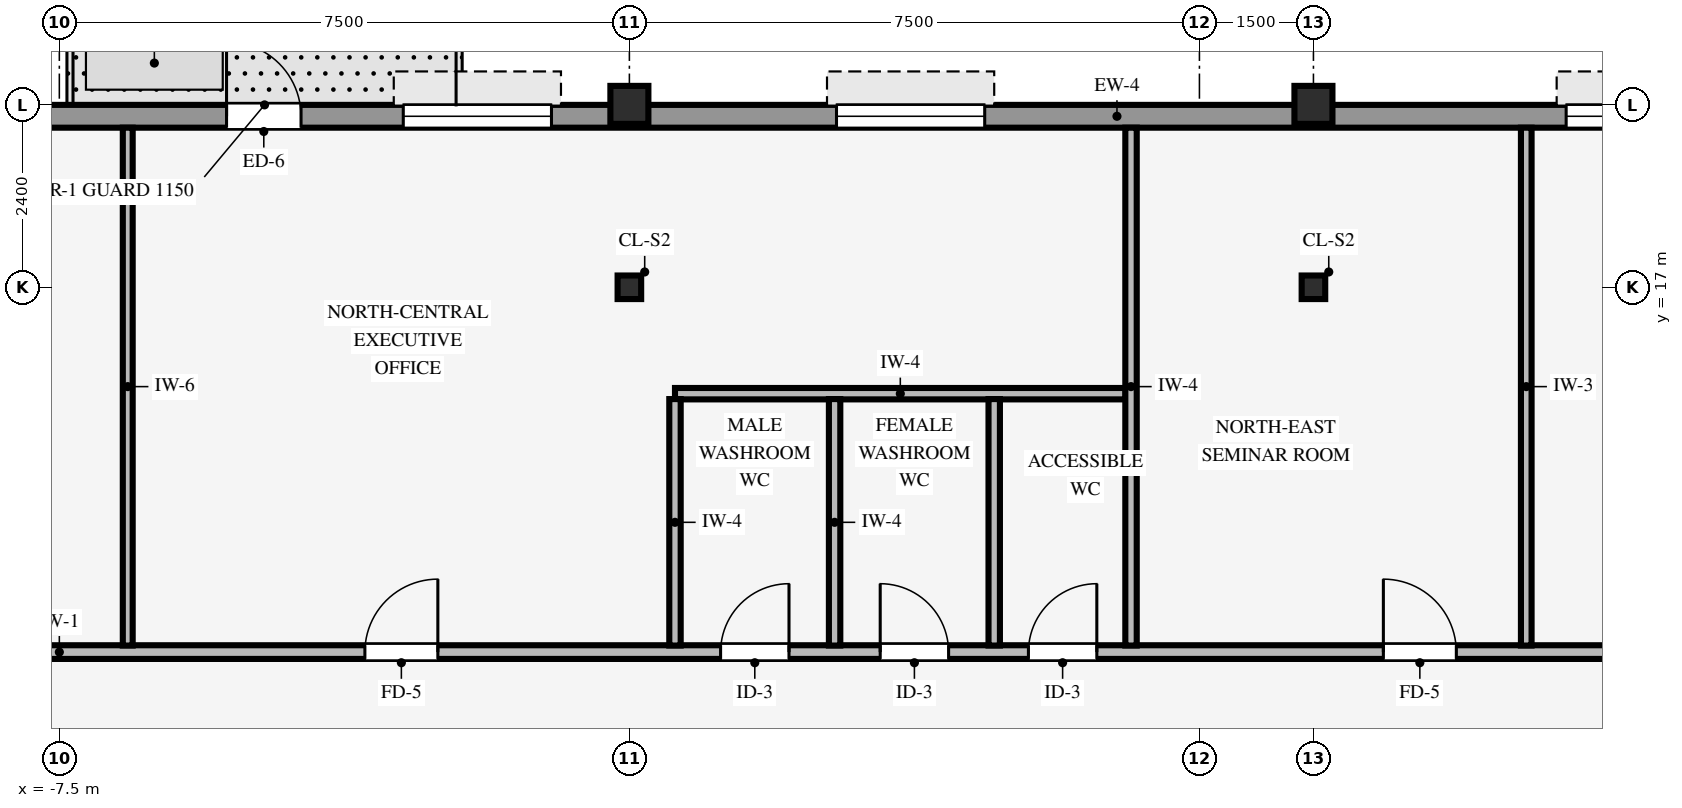
"""IFC4 building model, lengths in metres.
Left out: names, types, materials, properties, quantities, classifications, styles, units other than length and angle.
Written with IfcOpenShell. Run it as: python <this file> out.ifc"""

import sys

from ifc_helpers import new_model, si_unit, direction, frame, frame_2d, origin, origin_2d, place, context, subcontext, project, spatial, rectangle, hollow_rectangle, i_section, extrude, source, transform, mapped, element, fill, save


model = new_model("IFC4")
c1 = context("Model", 3, precision=1e-05, world=origin(), true_north=direction((0.0, 1.0)))
c2 = subcontext(c1, "Body", "Model", "MODEL_VIEW")
j1 = project(units=[si_unit("LENGTHUNIT", "METRE"), si_unit("PLANEANGLEUNIT", "RADIAN")], contexts=[c1])
p1 = place(None, origin())
s1 = spatial("IfcSite", under=j1, at=p1, CompositionType="ELEMENT")
p2 = place(p1, origin())
s2 = spatial("IfcBuilding", under=s1, at=p2, CompositionType="ELEMENT")
p3 = place(p2, frame((0.0, 0.0, 276.2)))
s3 = spatial("IfcBuildingStorey", under=s2, at=p3, CompositionType="ELEMENT", Elevation=276.2)
for number, where, z_axis, x_axis in (
    (1, (0.0, 19.4, 0.0), (0.0, 0.0, 1.0), (1.0, 0.0, 0.0)),
    (2, (9.0, 19.4, 0.0), (0.0, 0.0, 1.0), (1.0, 0.0, 0.0)),
):
    element("IfcColumn", number, at=place(p3, frame(where, z_axis=z_axis, x_axis=x_axis)), inside=s3, PredefinedType="COLUMN", context=c2, shape_type="SweptSolid", body=[
        extrude(hollow_rectangle(XDim=0.5, YDim=0.5, WallThickness=0.032, InnerFilletRadius=0.032, OuterFilletRadius=0.064, at=origin_2d()), origin(), (0.0, 0.0, 1.0), 3.37),
    ])
for number, where, z_axis, x_axis in (
    (3, (0.0, 17.0, 0.0), (0.0, 0.0, 1.0), (1.0, 0.0, 0.0)),
    (4, (9.0, 17.0, 0.0), (0.0, 0.0, 1.0), (1.0, 0.0, 0.0)),
):
    element("IfcColumn", number, at=place(p3, frame(where, z_axis=z_axis, x_axis=x_axis)), inside=s3, PredefinedType="COLUMN", context=c2, shape_type="SweptSolid", body=[
        extrude(i_section(OverallWidth=0.31, OverallDepth=0.31, WebThickness=0.015, FlangeThickness=0.015, FilletRadius=0.015, at=origin_2d()), origin(), (0.0, 0.0, 1.0), 3.37),
    ])
p4 = place(p3, frame((-18.9, 19.25, 0.0), z_axis=(0.0, 0.0, 1.0), x_axis=(1.0, 0.0, 0.0)))
e5 = element("IfcWall", 5, at=p4, inside=s3, PredefinedType="STANDARD", context=c2, shape_type="SweptSolid", body=[
    extrude(rectangle(XDim=35.6, YDim=0.3, at=frame_2d((17.8, 0.0))), origin(), (0.0, 0.0, 1.0), 2.705),
])
p5 = place(p4, frame((13.6, 0.0, 0.0)))
e6 = element("IfcOpeningElement", 6, at=p5, cuts=e5, PredefinedType="OPENING", context=c2, shape_type="SweptSolid", body=[
    extrude(rectangle(XDim=0.98, YDim=2.15, at=frame_2d((0.49, 1.075))), frame((0.0, 0.16, 0.0), z_axis=(0.0, -1.0, 0.0), x_axis=(1.0, 0.0, 0.0)), (0.0, 0.0, 1.0), 0.32),
])
p6 = place(p4, frame((2.425, 0.0, 0.8)))
e7 = element("IfcOpeningElement", 7, at=p6, cuts=e5, PredefinedType="OPENING", context=c2, shape_type="SweptSolid", body=[
    extrude(rectangle(XDim=1.95, YDim=1.48, at=frame_2d((0.975, 0.74))), frame((0.0, 0.16, 0.0), z_axis=(0.0, -1.0, 0.0), x_axis=(1.0, 0.0, 0.0)), (0.0, 0.0, 1.0), 0.32),
])
p7 = place(p4, frame((7.225, 0.0, 0.8)))
e8 = element("IfcOpeningElement", 8, at=p7, cuts=e5, PredefinedType="OPENING", context=c2, shape_type="SweptSolid", body=[
    extrude(rectangle(XDim=1.95, YDim=1.48, at=frame_2d((0.975, 0.74))), frame((0.0, 0.16, 0.0), z_axis=(0.0, -1.0, 0.0), x_axis=(1.0, 0.0, 0.0)), (0.0, 0.0, 1.0), 0.32),
])
p8 = place(p4, frame((15.925, 0.0, 0.8)))
e9 = element("IfcOpeningElement", 9, at=p8, cuts=e5, PredefinedType="OPENING", context=c2, shape_type="SweptSolid", body=[
    extrude(rectangle(XDim=1.95, YDim=1.48, at=frame_2d((0.975, 0.74))), frame((0.0, 0.16, 0.0), z_axis=(0.0, -1.0, 0.0), x_axis=(1.0, 0.0, 0.0)), (0.0, 0.0, 1.0), 0.32),
])
p9 = place(p4, frame((21.625, 0.0, 0.8)))
e10 = element("IfcOpeningElement", 10, at=p9, cuts=e5, PredefinedType="OPENING", context=c2, shape_type="SweptSolid", body=[
    extrude(rectangle(XDim=1.95, YDim=1.48, at=frame_2d((0.975, 0.74))), frame((0.0, 0.16, 0.0), z_axis=(0.0, -1.0, 0.0), x_axis=(1.0, 0.0, 0.0)), (0.0, 0.0, 1.0), 0.32),
])
p10 = place(p4, frame((31.225, 0.0, 0.8)))
e11 = element("IfcOpeningElement", 11, at=p10, cuts=e5, PredefinedType="OPENING", context=c2, shape_type="SweptSolid", body=[
    extrude(rectangle(XDim=1.95, YDim=1.48, at=frame_2d((0.975, 0.74))), frame((0.0, 0.16, 0.0), z_axis=(0.0, -1.0, 0.0), x_axis=(1.0, 0.0, 0.0)), (0.0, 0.0, 1.0), 0.32),
])
p11 = place(p3, frame((-15.0, 12.2, 0.0), z_axis=(0.0, 0.0, 1.0), x_axis=(1.0, 0.0, 0.0)))
e12 = element("IfcWall", 12, at=p11, inside=s3, PredefinedType="PARTITIONING", context=c2, shape_type="SweptSolid", body=[
    extrude(rectangle(XDim=30.8, YDim=0.18, at=frame_2d((15.4, 0.0))), origin(), (0.0, 0.0, 1.0), 3.36),
])
p12 = place(p11, frame((11.52, 0.0, 0.0)))
e13 = element("IfcOpeningElement", 13, at=p12, cuts=e12, PredefinedType="OPENING", context=c2, shape_type="SweptSolid", body=[
    extrude(rectangle(XDim=0.96, YDim=2.1, at=frame_2d((0.48, 1.05))), frame((0.0, 0.1, 0.0), z_axis=(0.0, -1.0, 0.0), x_axis=(1.0, 0.0, 0.0)), (0.0, 0.0, 1.0), 0.2),
])
p13 = place(p11, frame((2.52, 0.0, 0.0)))
e14 = element("IfcOpeningElement", 14, at=p13, cuts=e12, PredefinedType="OPENING", context=c2, shape_type="SweptSolid", body=[
    extrude(rectangle(XDim=0.96, YDim=2.1, at=frame_2d((0.48, 1.05))), frame((0.0, 0.1, 0.0), z_axis=(0.0, -1.0, 0.0), x_axis=(1.0, 0.0, 0.0)), (0.0, 0.0, 1.0), 0.2),
])
p14 = place(p11, frame((28.32, 0.0, 0.0)))
e15 = element("IfcOpeningElement", 15, at=p14, cuts=e12, PredefinedType="OPENING", context=c2, shape_type="SweptSolid", body=[
    extrude(rectangle(XDim=0.96, YDim=2.1, at=frame_2d((0.48, 1.05))), frame((0.0, 0.1, 0.0), z_axis=(0.0, -1.0, 0.0), x_axis=(1.0, 0.0, 0.0)), (0.0, 0.0, 1.0), 0.2),
])
p15 = place(p11, frame((24.92, 0.0, 0.0)))
e16 = element("IfcOpeningElement", 16, at=p15, cuts=e12, PredefinedType="OPENING", context=c2, shape_type="SweptSolid", body=[
    extrude(rectangle(XDim=0.96, YDim=2.1, at=frame_2d((0.48, 1.05))), frame((0.0, 0.1, 0.0), z_axis=(0.0, -1.0, 0.0), x_axis=(1.0, 0.0, 0.0)), (0.0, 0.0, 1.0), 0.2),
])
p16 = place(p11, frame((16.2, 0.0, 0.0)))
e17 = element("IfcOpeningElement", 17, at=p16, cuts=e12, PredefinedType="OPENING", context=c2, shape_type="SweptSolid", body=[
    extrude(rectangle(XDim=0.9, YDim=2.1, at=frame_2d((0.45, 1.05))), frame((0.0, 0.1, 0.0), z_axis=(0.0, -1.0, 0.0), x_axis=(1.0, 0.0, 0.0)), (0.0, 0.0, 1.0), 0.2),
])
p17 = place(p11, frame((18.3, 0.0, 0.0)))
e18 = element("IfcOpeningElement", 18, at=p17, cuts=e12, PredefinedType="OPENING", context=c2, shape_type="SweptSolid", body=[
    extrude(rectangle(XDim=0.9, YDim=2.1, at=frame_2d((0.45, 1.05))), frame((0.0, 0.1, 0.0), z_axis=(0.0, -1.0, 0.0), x_axis=(1.0, 0.0, 0.0)), (0.0, 0.0, 1.0), 0.2),
])
p18 = place(p11, frame((20.25, 0.0, 0.0)))
e19 = element("IfcOpeningElement", 19, at=p18, cuts=e12, PredefinedType="OPENING", context=c2, shape_type="SweptSolid", body=[
    extrude(rectangle(XDim=0.9, YDim=2.1, at=frame_2d((0.45, 1.05))), frame((0.0, 0.1, 0.0), z_axis=(0.0, -1.0, 0.0), x_axis=(1.0, 0.0, 0.0)), (0.0, 0.0, 1.0), 0.2),
])
p19 = place(p3, frame((0.6, 15.6, 0.0), z_axis=(0.0, 0.0, 1.0), x_axis=(1.0, 0.0, 0.0)))
e20 = element("IfcWall", 20, at=p19, inside=s3, PredefinedType="PARTITIONING", context=c2, shape_type="SweptSolid", body=[
    extrude(rectangle(XDim=5.929, YDim=0.15, at=frame_2d((2.964, 0.0))), origin(), (0.0, 0.0, 1.0), 3.36),
])
p20 = place(p3, frame((-6.6, 12.286, 0.0), z_axis=(0.0, 0.0, 1.0), x_axis=(0.0, 1.0, 0.0)))
e21 = element("IfcWall", 21, at=p20, inside=s3, PredefinedType="PARTITIONING", context=c2, shape_type="SweptSolid", body=[
    extrude(rectangle(XDim=6.814, YDim=0.13, at=frame_2d((3.407, 0.0))), origin(), (0.0, 0.0, 1.0), 3.36),
])
for number, where, z_axis, x_axis in (
    (22, (0.6, 12.286, 0.0), (0.0, 0.0, 1.0), (0.0, 1.0, 0.0)),
    (23, (2.7, 12.286, 0.0), (0.0, 0.0, 1.0), (0.0, 1.0, 0.0)),
    (24, (4.8, 12.286, 0.0), (0.0, 0.0, 1.0), (0.0, 1.0, 0.0)),
):
    element("IfcWall", number, at=place(p3, frame(where, z_axis=z_axis, x_axis=x_axis)), inside=s3, PredefinedType="PARTITIONING", context=c2, shape_type="SweptSolid", body=[
        extrude(rectangle(XDim=3.243, YDim=0.15, at=frame_2d((1.622, 0.0))), origin(), (0.0, 0.0, 1.0), 3.36),
    ])
p21 = place(p3, frame((6.6, 12.286, 0.0), z_axis=(0.0, 0.0, 1.0), x_axis=(0.0, 1.0, 0.0)))
e25 = element("IfcWall", 25, at=p21, inside=s3, PredefinedType="PARTITIONING", context=c2, shape_type="SweptSolid", body=[
    extrude(rectangle(XDim=6.814, YDim=0.15, at=frame_2d((3.407, 0.0))), origin(), (0.0, 0.0, 1.0), 3.36),
])
p22 = place(p3, frame((11.8, 12.286, 0.0), z_axis=(0.0, 0.0, 1.0), x_axis=(0.0, 1.0, 0.0)))
e26 = element("IfcWall", 26, at=p22, inside=s3, PredefinedType="PARTITIONING", context=c2, shape_type="SweptSolid", body=[
    extrude(rectangle(XDim=6.814, YDim=0.14, at=frame_2d((3.407, 0.0))), origin(), (0.0, 0.0, 1.0), 3.36),
])
m1 = source(origin(), c2, "Body", "SweptSolid", [
    extrude(rectangle(XDim=0.98, YDim=2.15, at=frame_2d((0.49, 1.075))), frame((0.0, 0.025, 0.0), z_axis=(0.0, -1.0, 0.0), x_axis=(1.0, 0.0, 0.0)), (0.0, 0.0, 1.0), 0.05),
])
p23 = place(p5, origin())
e27 = element("IfcDoor", 27, at=p23, inside=s3, OperationType="SINGLE_SWING_LEFT", PredefinedType="DOOR", context=c2, shape_type="MappedRepresentation", body=[
    mapped(m1, transform((0.0, 0.0, 0.0), scale=1.0)),
])
fill(e6, e27)
m2 = source(origin(), c2, "Body", "SweptSolid", [
    extrude(rectangle(XDim=1.95, YDim=1.48, at=frame_2d((0.975, 0.74))), frame((0.0, 0.03, 0.0), z_axis=(0.0, -1.0, 0.0), x_axis=(1.0, 0.0, 0.0)), (0.0, 0.0, 1.0), 0.06),
])
p24 = place(p8, origin())
e28 = element("IfcWindow", 28, at=p24, inside=s3, PartitioningType="SINGLE_PANEL", PredefinedType="WINDOW", context=c2, shape_type="MappedRepresentation", body=[
    mapped(m2, transform((0.0, 0.0, 0.0), scale=1.0)),
])
fill(e9, e28)
p25 = place(p9, origin())
e29 = element("IfcWindow", 29, at=p25, inside=s3, PartitioningType="SINGLE_PANEL", PredefinedType="WINDOW", context=c2, shape_type="MappedRepresentation", body=[
    mapped(m2, transform((0.0, 0.0, 0.0), scale=1.0)),
])
fill(e10, e29)
p26 = place(p10, origin())
e30 = element("IfcWindow", 30, at=p26, inside=s3, PartitioningType="SINGLE_PANEL", PredefinedType="WINDOW", context=c2, shape_type="MappedRepresentation", body=[
    mapped(m2, transform((0.0, 0.0, 0.0), scale=1.0)),
])
fill(e11, e30)
m3 = source(origin(), c2, "Body", "SweptSolid", [
    extrude(rectangle(XDim=0.96, YDim=2.1, at=frame_2d((0.48, 1.05))), frame((0.0, 0.025, 0.0), z_axis=(0.0, -1.0, 0.0), x_axis=(1.0, 0.0, 0.0)), (0.0, 0.0, 1.0), 0.05),
])
p27 = place(p12, origin())
e31 = element("IfcDoor", 31, at=p27, inside=s3, OperationType="SINGLE_SWING_RIGHT", PredefinedType="DOOR", context=c2, shape_type="MappedRepresentation", body=[
    mapped(m3, transform((0.0, 0.0, 0.0), scale=1.0)),
])
fill(e13, e31)
p28 = place(p15, origin())
e32 = element("IfcDoor", 32, at=p28, inside=s3, OperationType="SINGLE_SWING_LEFT", PredefinedType="DOOR", context=c2, shape_type="MappedRepresentation", body=[
    mapped(m3, transform((0.0, 0.0, 0.0), scale=1.0)),
])
fill(e16, e32)
m4 = source(origin(), c2, "Body", "SweptSolid", [
    extrude(rectangle(XDim=0.9, YDim=2.1, at=frame_2d((0.45, 1.05))), frame((0.0, 0.025, 0.0), z_axis=(0.0, -1.0, 0.0), x_axis=(1.0, 0.0, 0.0)), (0.0, 0.0, 1.0), 0.05),
])
p29 = place(p16, origin())
e33 = element("IfcDoor", 33, at=p29, inside=s3, OperationType="SINGLE_SWING_RIGHT", PredefinedType="DOOR", context=c2, shape_type="MappedRepresentation", body=[
    mapped(m4, transform((0.0, 0.0, 0.0), scale=1.0)),
])
fill(e17, e33)
p30 = place(p17, origin())
e34 = element("IfcDoor", 34, at=p30, inside=s3, OperationType="SINGLE_SWING_LEFT", PredefinedType="DOOR", context=c2, shape_type="MappedRepresentation", body=[
    mapped(m4, transform((0.0, 0.0, 0.0), scale=1.0)),
])
fill(e18, e34)
p31 = place(p18, origin())
e35 = element("IfcDoor", 35, at=p31, inside=s3, OperationType="SINGLE_SWING_RIGHT", PredefinedType="DOOR", context=c2, shape_type="MappedRepresentation", body=[
    mapped(m4, transform((0.0, 0.0, 0.0), scale=1.0)),
])
fill(e19, e35)
save(model, sys.argv[1])
